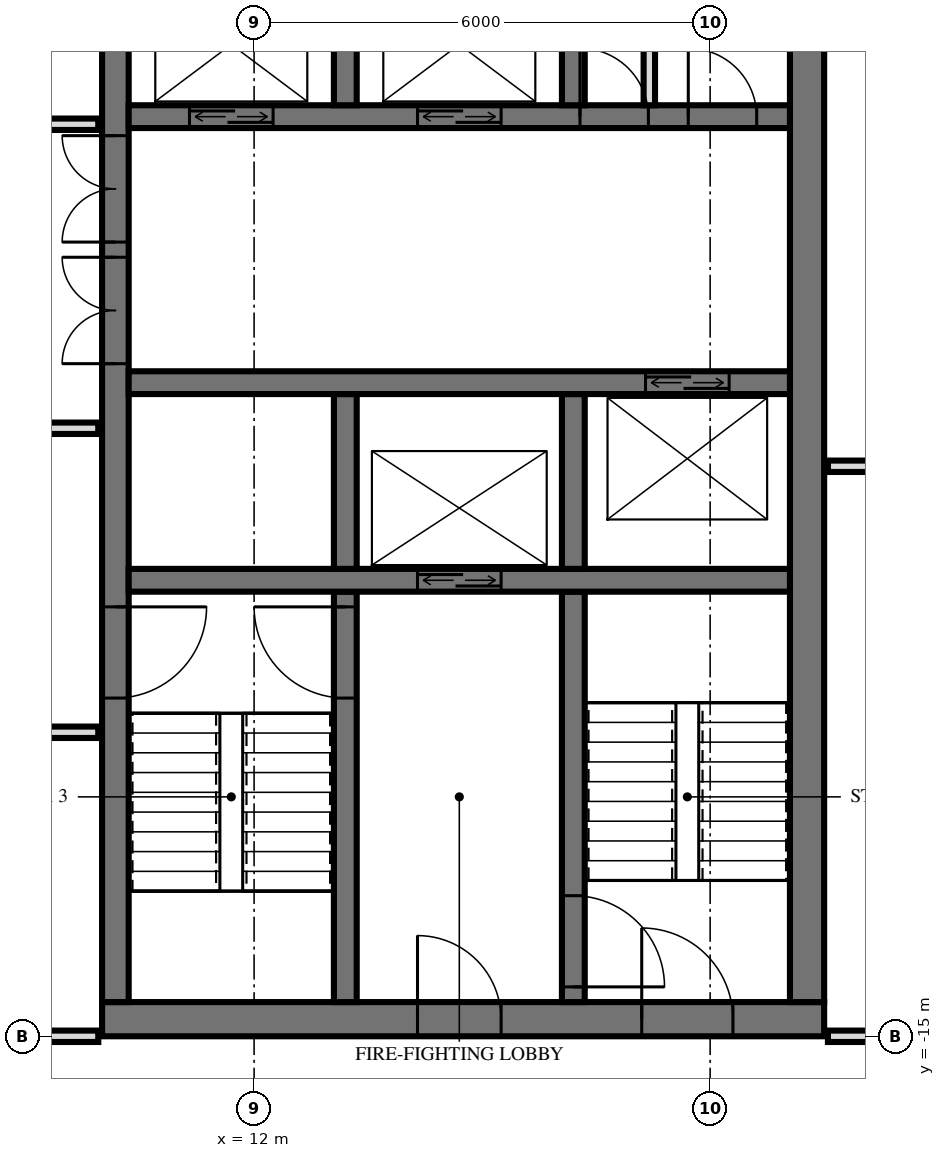
"""IFC4 building model, lengths in metres.
Left out: names, types, materials, properties, quantities, classifications, styles, units other than length and angle.
Written with IfcOpenShell. Run it as: python <this file> out.ifc"""

import sys

from ifc_helpers import new_model, si_unit, direction, frame, frame_2d, origin, place, context, subcontext, project, spatial, rectangle, extrude, element, fill, save


model = new_model("IFC4")
c1 = context("Model", 3, precision=1e-05, world=origin(), true_north=direction((0.0, 1.0)))
c2 = subcontext(c1, "Body", "Model", "MODEL_VIEW")
j1 = project(units=[si_unit("LENGTHUNIT", "METRE"), si_unit("PLANEANGLEUNIT", "RADIAN")], contexts=[c1])
p1 = place(None, origin())
s1 = spatial("IfcSite", under=j1, at=p1, CompositionType="ELEMENT")
p2 = place(p1, origin())
s2 = spatial("IfcBuilding", under=s1, at=p2, CompositionType="ELEMENT")
p3 = place(p2, frame((0.0, 0.0, 256.1)))
s3 = spatial("IfcBuildingStorey", under=s2, at=p3, CompositionType="ELEMENT", Elevation=256.1)
p4 = place(p3, frame((10.0, -14.775, 0.0), z_axis=(0.0, 0.0, 1.0), x_axis=(1.0, 0.0, 0.0)))
e1 = element("IfcWall", 1, at=p4, inside=s3, PredefinedType="SHEAR", context=c2, shape_type="SweptSolid", body=[
    extrude(rectangle(XDim=9.5, YDim=0.45, at=frame_2d((4.75, 0.0))), origin(), (0.0, 0.0, 1.0), 3.5),
])
p5 = place(p4, frame((7.1, 0.0, 0.0)))
e2 = element("IfcOpeningElement", 2, at=p5, cuts=e1, PredefinedType="OPENING", context=c2, shape_type="SweptSolid", body=[
    extrude(rectangle(XDim=1.2, YDim=2.1, at=frame_2d((0.6, 1.05))), frame((0.0, 0.235, 0.0), z_axis=(0.0, -1.0, 0.0), x_axis=(1.0, 0.0, 0.0)), (0.0, 0.0, 1.0), 0.47),
])
p6 = place(p4, frame((4.15, 0.0, 0.0)))
e3 = element("IfcOpeningElement", 3, at=p6, cuts=e1, PredefinedType="OPENING", context=c2, shape_type="SweptSolid", body=[
    extrude(rectangle(XDim=1.1, YDim=2.1, at=frame_2d((0.55, 1.05))), frame((0.0, 0.235, 0.0), z_axis=(0.0, -1.0, 0.0), x_axis=(1.0, 0.0, 0.0)), (0.0, 0.0, 1.0), 0.47),
])
p7 = place(p3, frame((10.175, -14.55, 0.0), z_axis=(0.0, 0.0, 1.0), x_axis=(0.0, 1.0, 0.0)))
e4 = element("IfcWall", 4, at=p7, inside=s3, PredefinedType="SHEAR", context=c2, shape_type="SweptSolid", body=[
    extrude(rectangle(XDim=14.1, YDim=0.35, at=frame_2d((7.05, 0.0))), origin(), (0.0, 0.0, 1.0), 3.5),
])
p8 = place(p7, frame((8.4, 0.0, 0.0)))
e5 = element("IfcOpeningElement", 5, at=p8, cuts=e4, PredefinedType="OPENING", context=c2, shape_type="SweptSolid", body=[
    extrude(rectangle(XDim=1.4, YDim=2.4, at=frame_2d((0.7, 1.2))), frame((0.0, 0.185, 0.0), z_axis=(0.0, -1.0, 0.0), x_axis=(1.0, 0.0, 0.0)), (0.0, 0.0, 1.0), 0.37),
])
p9 = place(p7, frame((10.0, 0.0, 0.0)))
e6 = element("IfcOpeningElement", 6, at=p9, cuts=e4, PredefinedType="OPENING", context=c2, shape_type="SweptSolid", body=[
    extrude(rectangle(XDim=1.4, YDim=2.4, at=frame_2d((0.7, 1.2))), frame((0.0, 0.185, 0.0), z_axis=(0.0, -1.0, 0.0), x_axis=(1.0, 0.0, 0.0)), (0.0, 0.0, 1.0), 0.37),
])
p10 = place(p7, frame((4.0, 0.0, 0.0)))
e7 = element("IfcOpeningElement", 7, at=p10, cuts=e4, PredefinedType="OPENING", context=c2, shape_type="SweptSolid", body=[
    extrude(rectangle(XDim=1.2, YDim=2.1, at=frame_2d((0.6, 1.05))), frame((0.0, 0.185, 0.0), z_axis=(0.0, -1.0, 0.0), x_axis=(1.0, 0.0, 0.0)), (0.0, 0.0, 1.0), 0.37),
])
p11 = place(p3, frame((19.275, -14.55, 0.0), z_axis=(0.0, 0.0, 1.0), x_axis=(0.0, 1.0, 0.0)))
e8 = element("IfcWall", 8, at=p11, inside=s3, PredefinedType="SHEAR", context=c2, shape_type="SweptSolid", body=[
    extrude(rectangle(XDim=14.1, YDim=0.45, at=frame_2d((7.05, 0.0))), origin(), (0.0, 0.0, 1.0), 3.5),
])
p12 = place(p3, frame((10.35, -2.9, 0.0), z_axis=(0.0, 0.0, 1.0), x_axis=(1.0, 0.0, 0.0)))
e9 = element("IfcWall", 9, at=p12, inside=s3, PredefinedType="SHEAR", context=c2, shape_type="SweptSolid", body=[
    extrude(rectangle(XDim=8.7, YDim=0.3, at=frame_2d((4.35, 0.0))), origin(), (0.0, 0.0, 1.0), 3.5),
])
p13 = place(p12, frame((0.8, 0.0, 0.0)))
e10 = element("IfcOpeningElement", 10, at=p13, cuts=e9, PredefinedType="OPENING", context=c2, shape_type="SweptSolid", body=[
    extrude(rectangle(XDim=1.1, YDim=2.1, at=frame_2d((0.55, 1.05))), frame((0.0, 0.16, 0.0), z_axis=(0.0, -1.0, 0.0), x_axis=(1.0, 0.0, 0.0)), (0.0, 0.0, 1.0), 0.32),
])
p14 = place(p12, frame((3.8, 0.0, 0.0)))
e11 = element("IfcOpeningElement", 11, at=p14, cuts=e9, PredefinedType="OPENING", context=c2, shape_type="SweptSolid", body=[
    extrude(rectangle(XDim=1.1, YDim=2.1, at=frame_2d((0.55, 1.05))), frame((0.0, 0.16, 0.0), z_axis=(0.0, -1.0, 0.0), x_axis=(1.0, 0.0, 0.0)), (0.0, 0.0, 1.0), 0.32),
])
p15 = place(p12, frame((5.938, 0.0, 0.0)))
e12 = element("IfcOpeningElement", 12, at=p15, cuts=e9, PredefinedType="OPENING", context=c2, shape_type="SweptSolid", body=[
    extrude(rectangle(XDim=0.9, YDim=2.1, at=frame_2d((0.45, 1.05))), frame((0.0, 0.16, 0.0), z_axis=(0.0, -1.0, 0.0), x_axis=(1.0, 0.0, 0.0)), (0.0, 0.0, 1.0), 0.32),
])
p16 = place(p12, frame((7.363, 0.0, 0.0)))
e13 = element("IfcOpeningElement", 13, at=p16, cuts=e9, PredefinedType="OPENING", context=c2, shape_type="SweptSolid", body=[
    extrude(rectangle(XDim=0.9, YDim=2.1, at=frame_2d((0.45, 1.05))), frame((0.0, 0.16, 0.0), z_axis=(0.0, -1.0, 0.0), x_axis=(1.0, 0.0, 0.0)), (0.0, 0.0, 1.0), 0.32),
])
p17 = place(p3, frame((10.35, -6.4, 0.0), z_axis=(0.0, 0.0, 1.0), x_axis=(1.0, 0.0, 0.0)))
e14 = element("IfcWall", 14, at=p17, inside=s3, PredefinedType="SHEAR", context=c2, shape_type="SweptSolid", body=[
    extrude(rectangle(XDim=8.7, YDim=0.3, at=frame_2d((4.35, 0.0))), origin(), (0.0, 0.0, 1.0), 3.5),
])
p18 = place(p17, frame((6.8, 0.0, 0.0)))
e15 = element("IfcOpeningElement", 15, at=p18, cuts=e14, PredefinedType="OPENING", context=c2, shape_type="SweptSolid", body=[
    extrude(rectangle(XDim=1.1, YDim=2.1, at=frame_2d((0.55, 1.05))), frame((0.0, 0.16, 0.0), z_axis=(0.0, -1.0, 0.0), x_axis=(1.0, 0.0, 0.0)), (0.0, 0.0, 1.0), 0.32),
])
p19 = place(p3, frame((10.35, -9.0, 0.0), z_axis=(0.0, 0.0, 1.0), x_axis=(1.0, 0.0, 0.0)))
e16 = element("IfcWall", 16, at=p19, inside=s3, PredefinedType="SHEAR", context=c2, shape_type="SweptSolid", body=[
    extrude(rectangle(XDim=8.7, YDim=0.3, at=frame_2d((4.35, 0.0))), origin(), (0.0, 0.0, 1.0), 3.5),
])
p20 = place(p19, frame((3.8, 0.0, 0.0)))
e17 = element("IfcOpeningElement", 17, at=p20, cuts=e16, PredefinedType="OPENING", context=c2, shape_type="SweptSolid", body=[
    extrude(rectangle(XDim=1.1, YDim=2.1, at=frame_2d((0.55, 1.05))), frame((0.0, 0.16, 0.0), z_axis=(0.0, -1.0, 0.0), x_axis=(1.0, 0.0, 0.0)), (0.0, 0.0, 1.0), 0.32),
])
for number, where, z_axis, x_axis in (
    (18, (13.2, -2.75, 0.0), (0.0, 0.0, 1.0), (0.0, 1.0, 0.0)),
    (19, (13.2, -8.85, 0.0), (0.0, 0.0, 1.0), (0.0, 1.0, 0.0)),
):
    element("IfcWall", number, at=place(p3, frame(where, z_axis=z_axis, x_axis=x_axis)), inside=s3, PredefinedType="SHEAR", context=c2, shape_type="SweptSolid", body=[
        extrude(rectangle(XDim=2.3, YDim=0.3, at=frame_2d((1.15, 0.0))), origin(), (0.0, 0.0, 1.0), 3.5),
    ])
p21 = place(p3, frame((13.2, -14.55, 0.0), z_axis=(0.0, 0.0, 1.0), x_axis=(0.0, 1.0, 0.0)))
e20 = element("IfcWall", 20, at=p21, inside=s3, PredefinedType="SHEAR", context=c2, shape_type="SweptSolid", body=[
    extrude(rectangle(XDim=5.4, YDim=0.3, at=frame_2d((2.7, 0.0))), origin(), (0.0, 0.0, 1.0), 3.5),
])
p22 = place(p21, frame((4.0, 0.0, 0.0)))
e21 = element("IfcOpeningElement", 21, at=p22, cuts=e20, PredefinedType="OPENING", context=c2, shape_type="SweptSolid", body=[
    extrude(rectangle(XDim=1.2, YDim=2.1, at=frame_2d((0.6, 1.05))), frame((0.0, 0.16, 0.0), z_axis=(0.0, -1.0, 0.0), x_axis=(1.0, 0.0, 0.0)), (0.0, 0.0, 1.0), 0.32),
])
for number, where, z_axis, x_axis in (
    (22, (16.2, -2.75, 0.0), (0.0, 0.0, 1.0), (0.0, 1.0, 0.0)),
    (23, (16.2, -8.85, 0.0), (0.0, 0.0, 1.0), (0.0, 1.0, 0.0)),
):
    element("IfcWall", number, at=place(p3, frame(where, z_axis=z_axis, x_axis=x_axis)), inside=s3, PredefinedType="SHEAR", context=c2, shape_type="SweptSolid", body=[
        extrude(rectangle(XDim=2.3, YDim=0.3, at=frame_2d((1.15, 0.0))), origin(), (0.0, 0.0, 1.0), 3.5),
    ])
p23 = place(p3, frame((16.2, -14.55, 0.0), z_axis=(0.0, 0.0, 1.0), x_axis=(0.0, 1.0, 0.0)))
e24 = element("IfcWall", 24, at=p23, inside=s3, PredefinedType="SHEAR", context=c2, shape_type="SweptSolid", body=[
    extrude(rectangle(XDim=5.4, YDim=0.3, at=frame_2d((2.7, 0.0))), origin(), (0.0, 0.0, 1.0), 3.5),
])
p24 = place(p23, frame((0.2, 0.0, 0.0)))
e25 = element("IfcOpeningElement", 25, at=p24, cuts=e24, PredefinedType="OPENING", context=c2, shape_type="SweptSolid", body=[
    extrude(rectangle(XDim=1.2, YDim=2.1, at=frame_2d((0.6, 1.05))), frame((0.0, 0.16, 0.0), z_axis=(0.0, -1.0, 0.0), x_axis=(1.0, 0.0, 0.0)), (0.0, 0.0, 1.0), 0.32),
])
p25 = place(p3, frame((17.2, -2.75, 0.0), z_axis=(0.0, 0.0, 1.0), x_axis=(0.0, 1.0, 0.0)))
e26 = element("IfcWall", 26, at=p25, inside=s3, PredefinedType="PARTITIONING", context=c2, shape_type="SweptSolid", body=[
    extrude(rectangle(XDim=2.3, YDim=0.15, at=frame_2d((1.15, 0.0))), origin(), (0.0, 0.0, 1.0), 3.2),
])
p26 = place(p3, frame((-9.95, -15.0, 0.0), z_axis=(0.0, 0.0, 1.0), x_axis=(1.0, 0.0, 0.0)))
e27 = element("IfcWall", 27, at=p26, inside=s3, PredefinedType="PARTITIONING", context=c2, shape_type="SweptSolid", body=[
    extrude(rectangle(XDim=19.9, YDim=0.15, at=frame_2d((9.95, 0.0))), origin(), (0.0, 0.0, 1.0), 2.584),
])
p27 = place(p26, frame((9.45, 0.0, 0.0)))
e28 = element("IfcOpeningElement", 28, at=p27, cuts=e27, PredefinedType="OPENING", context=c2, shape_type="SweptSolid", body=[
    extrude(rectangle(XDim=1.0, YDim=2.1, at=frame_2d((0.5, 1.05))), frame((0.0, 0.085, 0.0), z_axis=(0.0, -1.0, 0.0), x_axis=(1.0, 0.0, 0.0)), (0.0, 0.0, 1.0), 0.17),
])
p28 = place(p3, frame((19.55, -15.0, 0.0), z_axis=(0.0, 0.0, 1.0), x_axis=(1.0, 0.0, 0.0)))
e29 = element("IfcWall", 29, at=p28, inside=s3, PredefinedType="PARTITIONING", context=c2, shape_type="SweptSolid", body=[
    extrude(rectangle(XDim=3.37, YDim=0.15, at=frame_2d((1.685, 0.0))), origin(), (0.0, 0.0, 1.0), 3.22),
])
p29 = place(p28, frame((0.9, 0.0, 0.0)))
e30 = element("IfcOpeningElement", 30, at=p29, cuts=e29, PredefinedType="OPENING", context=c2, shape_type="SweptSolid", body=[
    extrude(rectangle(XDim=1.0, YDim=2.1, at=frame_2d((0.5, 1.05))), frame((0.0, 0.085, 0.0), z_axis=(0.0, -1.0, 0.0), x_axis=(1.0, 0.0, 0.0)), (0.0, 0.0, 1.0), 0.17),
])
p30 = place(p3, frame((-9.95, -11.0, 0.0), z_axis=(0.0, 0.0, 1.0), x_axis=(1.0, 0.0, 0.0)))
e31 = element("IfcWall", 31, at=p30, inside=s3, PredefinedType="PARTITIONING", context=c2, shape_type="SweptSolid", body=[
    extrude(rectangle(XDim=19.9, YDim=0.15, at=frame_2d((9.95, 0.0))), origin(), (0.0, 0.0, 1.0), 3.22),
])
p31 = place(p30, frame((9.45, 0.0, 0.0)))
e32 = element("IfcOpeningElement", 32, at=p31, cuts=e31, PredefinedType="OPENING", context=c2, shape_type="SweptSolid", body=[
    extrude(rectangle(XDim=1.0, YDim=2.1, at=frame_2d((0.5, 1.05))), frame((0.0, 0.085, 0.0), z_axis=(0.0, -1.0, 0.0), x_axis=(1.0, 0.0, 0.0)), (0.0, 0.0, 1.0), 0.17),
])
p32 = place(p30, frame((15.45, 0.0, 0.0)))
e33 = element("IfcOpeningElement", 33, at=p32, cuts=e31, PredefinedType="OPENING", context=c2, shape_type="SweptSolid", body=[
    extrude(rectangle(XDim=1.0, YDim=2.1, at=frame_2d((0.5, 1.05))), frame((0.0, 0.085, 0.0), z_axis=(0.0, -1.0, 0.0), x_axis=(1.0, 0.0, 0.0)), (0.0, 0.0, 1.0), 0.17),
])
p33 = place(p3, frame((19.55, -7.5, 0.0), z_axis=(0.0, 0.0, 1.0), x_axis=(1.0, 0.0, 0.0)))
e34 = element("IfcWall", 34, at=p33, inside=s3, PredefinedType="PARTITIONING", context=c2, shape_type="SweptSolid", body=[
    extrude(rectangle(XDim=3.37, YDim=0.15, at=frame_2d((1.685, 0.0))), origin(), (0.0, 0.0, 1.0), 3.22),
])
p34 = place(p33, frame((1.3, 0.0, 0.0)))
e35 = element("IfcOpeningElement", 35, at=p34, cuts=e34, PredefinedType="OPENING", context=c2, shape_type="SweptSolid", body=[
    extrude(rectangle(XDim=0.9, YDim=2.1, at=frame_2d((0.45, 1.05))), frame((0.0, 0.085, 0.0), z_axis=(0.0, -1.0, 0.0), x_axis=(1.0, 0.0, 0.0)), (0.0, 0.0, 1.0), 0.17),
])
p35 = place(p3, frame((-9.95, -7.0, 0.0), z_axis=(0.0, 0.0, 1.0), x_axis=(1.0, 0.0, 0.0)))
e36 = element("IfcWall", 36, at=p35, inside=s3, PredefinedType="PARTITIONING", context=c2, shape_type="SweptSolid", body=[
    extrude(rectangle(XDim=19.9, YDim=0.15, at=frame_2d((9.95, 0.0))), origin(), (0.0, 0.0, 1.0), 3.22),
])
p36 = place(p35, frame((9.45, 0.0, 0.0)))
e37 = element("IfcOpeningElement", 37, at=p36, cuts=e36, PredefinedType="OPENING", context=c2, shape_type="SweptSolid", body=[
    extrude(rectangle(XDim=1.0, YDim=2.1, at=frame_2d((0.5, 1.05))), frame((0.0, 0.085, 0.0), z_axis=(0.0, -1.0, 0.0), x_axis=(1.0, 0.0, 0.0)), (0.0, 0.0, 1.0), 0.17),
])
p37 = place(p35, frame((3.45, 0.0, 0.0)))
e38 = element("IfcOpeningElement", 38, at=p37, cuts=e36, PredefinedType="OPENING", context=c2, shape_type="SweptSolid", body=[
    extrude(rectangle(XDim=1.0, YDim=2.1, at=frame_2d((0.5, 1.05))), frame((0.0, 0.085, 0.0), z_axis=(0.0, -1.0, 0.0), x_axis=(1.0, 0.0, 0.0)), (0.0, 0.0, 1.0), 0.17),
])
p38 = place(p3, frame((-9.95, -3.0, 0.0), z_axis=(0.0, 0.0, 1.0), x_axis=(1.0, 0.0, 0.0)))
e39 = element("IfcWall", 39, at=p38, inside=s3, PredefinedType="PARTITIONING", context=c2, shape_type="SweptSolid", body=[
    extrude(rectangle(XDim=19.9, YDim=0.15, at=frame_2d((9.95, 0.0))), origin(), (0.0, 0.0, 1.0), 3.22),
])
p39 = place(p38, frame((0.95, 0.0, 0.0)))
e40 = element("IfcOpeningElement", 40, at=p39, cuts=e39, PredefinedType="OPENING", context=c2, shape_type="SweptSolid", body=[
    extrude(rectangle(XDim=1.0, YDim=2.1, at=frame_2d((0.5, 1.05))), frame((0.0, 0.085, 0.0), z_axis=(0.0, -1.0, 0.0), x_axis=(1.0, 0.0, 0.0)), (0.0, 0.0, 1.0), 0.17),
])
p40 = place(p38, frame((3.7, 0.0, 0.0)))
e41 = element("IfcOpeningElement", 41, at=p40, cuts=e39, PredefinedType="OPENING", context=c2, shape_type="SweptSolid", body=[
    extrude(rectangle(XDim=1.0, YDim=2.1, at=frame_2d((0.5, 1.05))), frame((0.0, 0.085, 0.0), z_axis=(0.0, -1.0, 0.0), x_axis=(1.0, 0.0, 0.0)), (0.0, 0.0, 1.0), 0.17),
])
p41 = place(p38, frame((8.45, 0.0, 0.0)))
e42 = element("IfcOpeningElement", 42, at=p41, cuts=e39, PredefinedType="OPENING", context=c2, shape_type="SweptSolid", body=[
    extrude(rectangle(XDim=1.0, YDim=2.1, at=frame_2d((0.5, 1.05))), frame((0.0, 0.085, 0.0), z_axis=(0.0, -1.0, 0.0), x_axis=(1.0, 0.0, 0.0)), (0.0, 0.0, 1.0), 0.17),
])
p42 = place(p38, frame((15.7, 0.0, 0.0)))
e43 = element("IfcOpeningElement", 43, at=p42, cuts=e39, PredefinedType="OPENING", context=c2, shape_type="SweptSolid", body=[
    extrude(rectangle(XDim=1.0, YDim=2.1, at=frame_2d((0.5, 1.05))), frame((0.0, 0.085, 0.0), z_axis=(0.0, -1.0, 0.0), x_axis=(1.0, 0.0, 0.0)), (0.0, 0.0, 1.0), 0.17),
])
p43 = place(p13, origin())
e44 = element("IfcDoor", 44, at=p43, inside=s3, OperationType="DOUBLE_DOOR_SLIDING", PredefinedType="USERDEFINED", context=c2, shape_type="SweptSolid", body=[
    extrude(rectangle(XDim=1.1, YDim=2.1, at=frame_2d((0.55, 1.05))), frame((0.0, 0.025, 0.0), z_axis=(0.0, -1.0, 0.0), x_axis=(1.0, 0.0, 0.0)), (0.0, 0.0, 1.0), 0.05),
])
fill(e10, e44)
p44 = place(p14, origin())
e45 = element("IfcDoor", 45, at=p44, inside=s3, OperationType="DOUBLE_DOOR_SLIDING", PredefinedType="USERDEFINED", context=c2, shape_type="SweptSolid", body=[
    extrude(rectangle(XDim=1.1, YDim=2.1, at=frame_2d((0.55, 1.05))), frame((0.0, 0.025, 0.0), z_axis=(0.0, -1.0, 0.0), x_axis=(1.0, 0.0, 0.0)), (0.0, 0.0, 1.0), 0.05),
])
fill(e11, e45)
p45 = place(p20, origin())
e46 = element("IfcDoor", 46, at=p45, inside=s3, OperationType="DOUBLE_DOOR_SLIDING", PredefinedType="USERDEFINED", context=c2, shape_type="SweptSolid", body=[
    extrude(rectangle(XDim=1.1, YDim=2.1, at=frame_2d((0.55, 1.05))), frame((0.0, 0.025, 0.0), z_axis=(0.0, -1.0, 0.0), x_axis=(1.0, 0.0, 0.0)), (0.0, 0.0, 1.0), 0.05),
])
fill(e17, e46)
p46 = place(p18, origin())
e47 = element("IfcDoor", 47, at=p46, inside=s3, OperationType="DOUBLE_DOOR_SLIDING", PredefinedType="USERDEFINED", context=c2, shape_type="SweptSolid", body=[
    extrude(rectangle(XDim=1.1, YDim=2.1, at=frame_2d((0.55, 1.05))), frame((0.0, 0.025, 0.0), z_axis=(0.0, -1.0, 0.0), x_axis=(1.0, 0.0, 0.0)), (0.0, 0.0, 1.0), 0.05),
])
fill(e15, e47)
p47 = place(p8, origin())
e48 = element("IfcDoor", 48, at=p47, inside=s3, OperationType="DOUBLE_DOOR_SINGLE_SWING", PredefinedType="DOOR", context=c2, shape_type="SweptSolid", body=[
    extrude(rectangle(XDim=1.4, YDim=2.4, at=frame_2d((0.7, 1.2))), frame((0.0, 0.025, 0.0), z_axis=(0.0, -1.0, 0.0), x_axis=(1.0, 0.0, 0.0)), (0.0, 0.0, 1.0), 0.05),
])
fill(e5, e48)
p48 = place(p9, origin())
e49 = element("IfcDoor", 49, at=p48, inside=s3, OperationType="DOUBLE_DOOR_SINGLE_SWING", PredefinedType="DOOR", context=c2, shape_type="SweptSolid", body=[
    extrude(rectangle(XDim=1.4, YDim=2.4, at=frame_2d((0.7, 1.2))), frame((0.0, 0.025, 0.0), z_axis=(0.0, -1.0, 0.0), x_axis=(1.0, 0.0, 0.0)), (0.0, 0.0, 1.0), 0.05),
])
fill(e6, e49)
p49 = place(p10, frame((0.6, 0.0, 0.0), z_axis=(0.0, 0.0, 1.0), x_axis=(-1.0, 0.0, 0.0)))
e50 = element("IfcDoor", 50, at=p49, inside=s3, OperationType="SINGLE_SWING_RIGHT", PredefinedType="DOOR", context=c2, shape_type="SweptSolid", body=[
    extrude(rectangle(XDim=1.2, YDim=2.1, at=frame_2d((0.0, 1.05))), frame((0.0, -0.025, 0.0), z_axis=(0.0, 1.0, 0.0), x_axis=(-1.0, 0.0, 0.0)), (0.0, 0.0, 1.0), 0.05),
])
fill(e7, e50)
p50 = place(p5, origin())
e51 = element("IfcDoor", 51, at=p50, inside=s3, OperationType="SINGLE_SWING_RIGHT", PredefinedType="DOOR", context=c2, shape_type="SweptSolid", body=[
    extrude(rectangle(XDim=1.2, YDim=2.1, at=frame_2d((0.6, 1.05))), frame((0.0, 0.025, 0.0), z_axis=(0.0, -1.0, 0.0), x_axis=(1.0, 0.0, 0.0)), (0.0, 0.0, 1.0), 0.05),
])
fill(e2, e51)
p51 = place(p6, origin())
e52 = element("IfcDoor", 52, at=p51, inside=s3, OperationType="SINGLE_SWING_RIGHT", PredefinedType="DOOR", context=c2, shape_type="SweptSolid", body=[
    extrude(rectangle(XDim=1.1, YDim=2.1, at=frame_2d((0.55, 1.05))), frame((0.0, 0.025, 0.0), z_axis=(0.0, -1.0, 0.0), x_axis=(1.0, 0.0, 0.0)), (0.0, 0.0, 1.0), 0.05),
])
fill(e3, e52)
p52 = place(p15, origin())
e53 = element("IfcDoor", 53, at=p52, inside=s3, OperationType="SINGLE_SWING_RIGHT", PredefinedType="DOOR", context=c2, shape_type="SweptSolid", body=[
    extrude(rectangle(XDim=0.9, YDim=2.1, at=frame_2d((0.45, 1.05))), frame((0.0, 0.025, 0.0), z_axis=(0.0, -1.0, 0.0), x_axis=(1.0, 0.0, 0.0)), (0.0, 0.0, 1.0), 0.05),
])
fill(e12, e53)
p53 = place(p16, origin())
e54 = element("IfcDoor", 54, at=p53, inside=s3, OperationType="SINGLE_SWING_RIGHT", PredefinedType="DOOR", context=c2, shape_type="SweptSolid", body=[
    extrude(rectangle(XDim=0.9, YDim=2.1, at=frame_2d((0.45, 1.05))), frame((0.0, 0.025, 0.0), z_axis=(0.0, -1.0, 0.0), x_axis=(1.0, 0.0, 0.0)), (0.0, 0.0, 1.0), 0.05),
])
fill(e13, e54)
p54 = place(p22, origin())
e55 = element("IfcDoor", 55, at=p54, inside=s3, OperationType="SINGLE_SWING_LEFT", PredefinedType="DOOR", context=c2, shape_type="SweptSolid", body=[
    extrude(rectangle(XDim=1.2, YDim=2.1, at=frame_2d((0.6, 1.05))), frame((0.0, 0.025, 0.0), z_axis=(0.0, -1.0, 0.0), x_axis=(1.0, 0.0, 0.0)), (0.0, 0.0, 1.0), 0.05),
])
fill(e21, e55)
p55 = place(p24, frame((0.6, 0.0, 0.0), z_axis=(0.0, 0.0, 1.0), x_axis=(-1.0, 0.0, 0.0)))
e56 = element("IfcDoor", 56, at=p55, inside=s3, OperationType="SINGLE_SWING_LEFT", PredefinedType="DOOR", context=c2, shape_type="SweptSolid", body=[
    extrude(rectangle(XDim=1.2, YDim=2.1, at=frame_2d((0.0, 1.05))), frame((0.0, -0.025, 0.0), z_axis=(0.0, 1.0, 0.0), x_axis=(-1.0, 0.0, 0.0)), (0.0, 0.0, 1.0), 0.05),
])
fill(e25, e56)
save(model, sys.argv[1])
